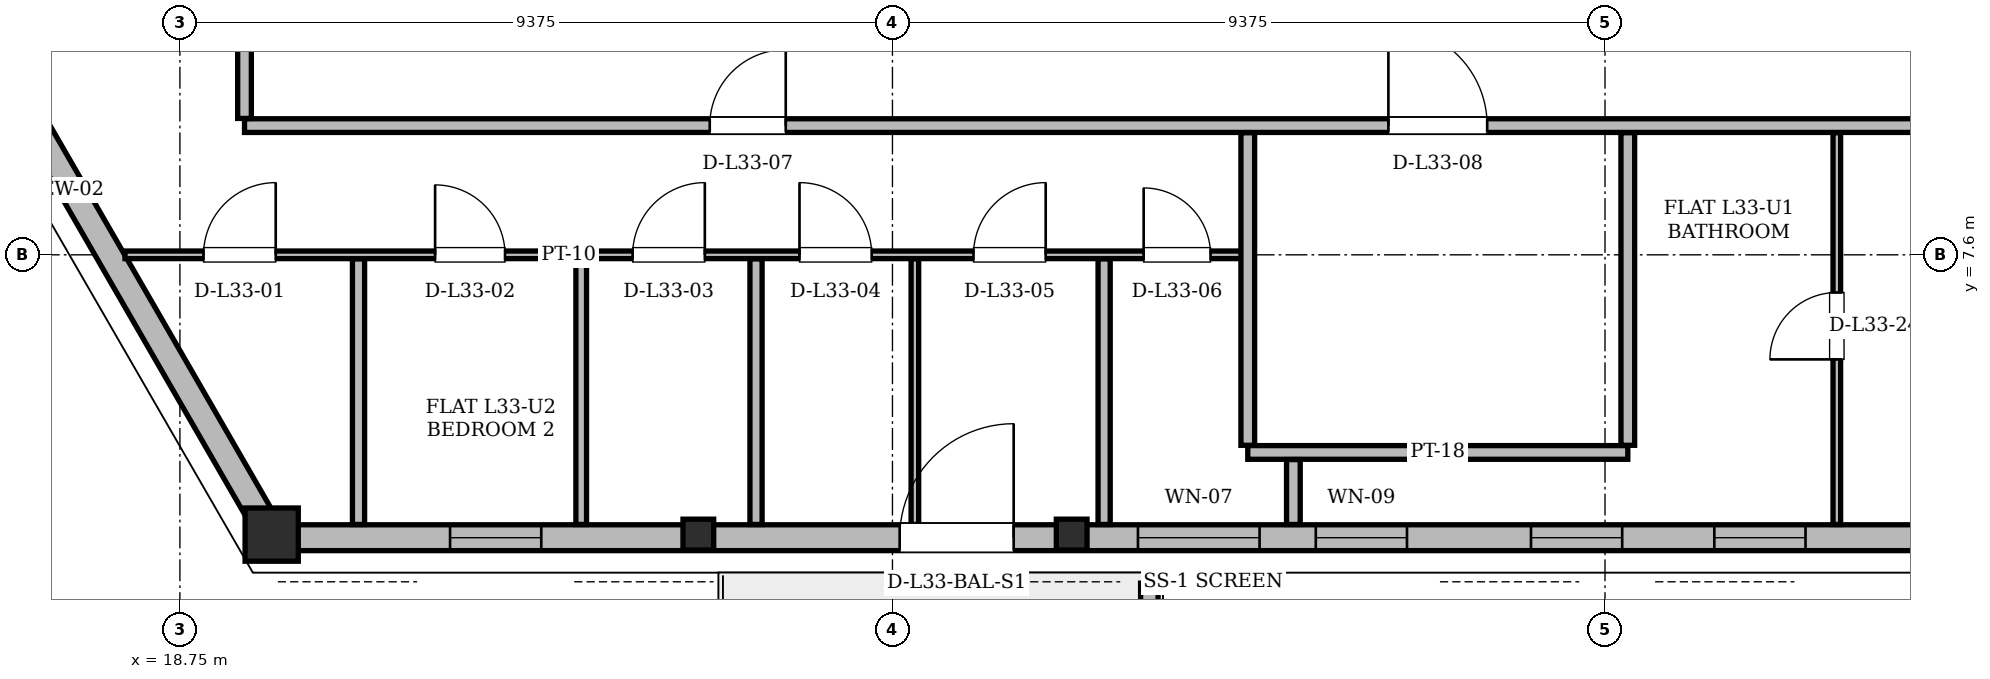
"""IFC4 building model, lengths in metres.
Left out: names, types, materials, properties, quantities, classifications, styles, units other than length and angle.
Written with IfcOpenShell. Run it as: python <this file> out.ifc"""

import sys

from ifc_helpers import new_model, si_unit, direction, frame, frame_2d, origin, origin_2d, place, context, subcontext, project, spatial, polyline, rectangle, hollow_rectangle, i_section, outline, extrude, element, fill, save


model = new_model("IFC4")
c1 = context("Model", 3, precision=1e-05, world=origin(), true_north=direction((0.0, 1.0)))
c2 = subcontext(c1, "Body", "Model", "MODEL_VIEW")
j1 = project(units=[si_unit("LENGTHUNIT", "METRE"), si_unit("PLANEANGLEUNIT", "RADIAN")], contexts=[c1])
p1 = place(None, origin())
s1 = spatial("IfcSite", under=j1, at=p1, CompositionType="ELEMENT")
p2 = place(p1, origin())
s2 = spatial("IfcBuilding", under=s1, at=p2, CompositionType="ELEMENT")
p3 = place(p2, frame((0.0, 0.0, 126.6)))
s3 = spatial("IfcBuildingStorey", under=s2, at=p3, CompositionType="ELEMENT", Elevation=126.6)
p4 = place(p3, frame((19.976, 3.878, 0.004), z_axis=(-0.010126722632, 0.022700170195, 0.999691028149), x_axis=(-0.913246900768, -0.40740655154, 0.0)))
e1 = element("IfcColumn", 1, at=p4, inside=s3, PredefinedType="COLUMN", context=c2, shape_type="SweptSolid", body=[
    extrude(hollow_rectangle(XDim=0.7, YDim=0.7, WallThickness=0.055, at=origin_2d()), origin(), (0.0, 0.0, 1.0), 3.592),
])
for number, where, z_axis, x_axis in (
    (2, (25.583, 3.878, 0.004), (-0.007, 0.023, 1.0), (-0.957, -0.289, 0.0)),
    (3, (30.49, 3.878, 0.004), (-0.004, 0.023, 1.0), (-0.984, -0.177, 0.0)),
):
    element("IfcColumn", number, at=place(p3, frame(where, z_axis=z_axis, x_axis=x_axis)), inside=s3, PredefinedType="COLUMN", context=c2, shape_type="SweptSolid", body=[
        extrude(i_section(OverallWidth=0.404, OverallDepth=0.406, WebThickness=0.027, FlangeThickness=0.044, at=origin_2d()), origin(), (0.0, 0.0, 1.0), 3.592),
    ])
p5 = place(p3, frame((14.689, 13.034, 0.0), z_axis=(0.0, 0.0, 1.0), x_axis=(0.500003640647, -0.866023301845, 0.0)))
e4 = element("IfcWall", 4, at=p5, inside=s3, PredefinedType="SOLIDWALL", context=c2, shape_type="SweptSolid", body=[
    extrude(rectangle(XDim=10.572, YDim=0.34, at=frame_2d((5.286, 0.0))), origin(), (0.0, 0.0, 1.0), 2.578),
])
p6 = place(p3, frame((19.976, 3.878, 0.0), z_axis=(0.0, 0.0, 1.0), x_axis=(1.0, 0.0, 0.0)))
e5 = element("IfcWall", 5, at=p6, inside=s3, PredefinedType="SOLIDWALL", context=c2, shape_type="SweptSolid", body=[
    extrude(rectangle(XDim=35.049, YDim=0.34, at=frame_2d((17.524, 0.0))), origin(), (0.0, 0.0, 1.0), 2.578),
])
p7 = place(p6, frame((8.244, 0.0, 0.0)))
e6 = element("IfcOpeningElement", 6, at=p7, cuts=e5, PredefinedType="OPENING", context=c2, shape_type="SweptSolid", body=[
    extrude(rectangle(XDim=1.5, YDim=2.2, at=frame_2d((0.75, 1.1))), frame((0.0, 0.17, 0.0), z_axis=(0.0, -1.0, 0.0), x_axis=(1.0, 0.0, 0.0)), (0.0, 0.0, 1.0), 0.34),
])
p8 = place(p6, frame((27.18, 0.0, 0.0)))
e7 = element("IfcOpeningElement", 7, at=p8, cuts=e5, PredefinedType="OPENING", context=c2, shape_type="SweptSolid", body=[
    extrude(rectangle(XDim=1.5, YDim=2.2, at=frame_2d((0.75, 1.1))), frame((0.0, 0.17, 0.0), z_axis=(0.0, -1.0, 0.0), x_axis=(1.0, 0.0, 0.0)), (0.0, 0.0, 1.0), 0.34),
])
p9 = place(p6, frame((13.719, 0.0, 0.85)))
e8 = element("IfcOpeningElement", 8, at=p9, cuts=e5, PredefinedType="OPENING", context=c2, shape_type="SweptSolid", body=[
    extrude(rectangle(XDim=1.2, YDim=1.48, at=frame_2d((0.6, 0.74))), frame((0.0, 0.17, 0.0), z_axis=(0.0, -1.0, 0.0), x_axis=(1.0, 0.0, 0.0)), (0.0, 0.0, 1.0), 0.34),
])
p10 = place(p6, frame((16.551, 0.0, 0.85)))
e9 = element("IfcOpeningElement", 9, at=p10, cuts=e5, PredefinedType="OPENING", context=c2, shape_type="SweptSolid", body=[
    extrude(rectangle(XDim=1.2, YDim=1.48, at=frame_2d((0.6, 0.74))), frame((0.0, 0.17, 0.0), z_axis=(0.0, -1.0, 0.0), x_axis=(1.0, 0.0, 0.0)), (0.0, 0.0, 1.0), 0.34),
])
p11 = place(p6, frame((22.366, 0.0, 0.85)))
e10 = element("IfcOpeningElement", 10, at=p11, cuts=e5, PredefinedType="OPENING", context=c2, shape_type="SweptSolid", body=[
    extrude(rectangle(XDim=1.2, YDim=1.48, at=frame_2d((0.6, 0.74))), frame((0.0, 0.17, 0.0), z_axis=(0.0, -1.0, 0.0), x_axis=(1.0, 0.0, 0.0)), (0.0, 0.0, 1.0), 0.34),
])
p12 = place(p6, frame((30.777, 0.0, 0.85)))
e11 = element("IfcOpeningElement", 11, at=p12, cuts=e5, PredefinedType="OPENING", context=c2, shape_type="SweptSolid", body=[
    extrude(rectangle(XDim=2.6, YDim=1.618, at=frame_2d((1.3, 0.809))), frame((0.0, 0.17, 0.0), z_axis=(0.0, -1.0, 0.0), x_axis=(1.0, 0.0, 0.0)), (0.0, 0.0, 1.0), 0.34),
])
p13 = place(p6, frame((18.963, 0.0, 0.85)))
e12 = element("IfcOpeningElement", 12, at=p13, cuts=e5, PredefinedType="OPENING", context=c2, shape_type="SweptSolid", body=[
    extrude(rectangle(XDim=1.2, YDim=1.48, at=frame_2d((0.6, 0.74))), frame((0.0, 0.17, 0.0), z_axis=(0.0, -1.0, 0.0), x_axis=(1.0, 0.0, 0.0)), (0.0, 0.0, 1.0), 0.34),
])
p14 = place(p6, frame((2.329, 0.0, 0.85)))
e13 = element("IfcOpeningElement", 13, at=p14, cuts=e5, PredefinedType="OPENING", context=c2, shape_type="SweptSolid", body=[
    extrude(rectangle(XDim=1.2, YDim=1.48, at=frame_2d((0.6, 0.74))), frame((0.0, 0.17, 0.0), z_axis=(0.0, -1.0, 0.0), x_axis=(1.0, 0.0, 0.0)), (0.0, 0.0, 1.0), 0.34),
])
p15 = place(p6, frame((11.38, 0.0, 0.85)))
e14 = element("IfcOpeningElement", 14, at=p15, cuts=e5, PredefinedType="OPENING", context=c2, shape_type="SweptSolid", body=[
    extrude(rectangle(XDim=1.6, YDim=1.618, at=frame_2d((0.8, 0.809))), frame((0.0, 0.17, 0.0), z_axis=(0.0, -1.0, 0.0), x_axis=(1.0, 0.0, 0.0)), (0.0, 0.0, 1.0), 0.34),
])
p16 = place(p3, frame((31.505, 3.28, 0.0), z_axis=(0.0, 0.0, 1.0), x_axis=(0.0, -1.0, 0.0)))
e15 = element("IfcWall", 15, at=p16, inside=s3, PredefinedType="PARAPET", context=c2, shape_type="SweptSolid", body=[
    extrude(outline(polyline([(0.0, 0.0), (2.042, 0.0), (2.042, 1.1), (0.0, 1.32), (0.0, 0.0)])), frame((0.0, 0.115, 0.0), z_axis=(0.0, -1.0, 0.0), x_axis=(1.0, 0.0, 0.0)), (0.0, 0.0, 1.0), 0.23),
])
p17 = place(p3, frame((32.8, 5.0, 0.0), z_axis=(0.0, 0.0, 1.0), x_axis=(1.0, 0.0, 0.0)))
e16 = element("IfcWall", 16, at=p17, inside=s3, PredefinedType="PARTITIONING", context=c2, shape_type="SweptSolid", body=[
    extrude(rectangle(XDim=5.0, YDim=0.18, at=frame_2d((2.5, 0.0))), origin(), (0.0, 0.0, 1.0), 3.36),
])
p18 = place(p3, frame((18.028, 7.6, 0.0), z_axis=(0.0, 0.0, 1.0), x_axis=(1.0, 0.0, 0.0)))
e17 = element("IfcWall", 17, at=p18, inside=s3, PredefinedType="PARTITIONING", context=c2, shape_type="SweptSolid", body=[
    extrude(rectangle(XDim=14.823, YDim=0.1, at=frame_2d((7.411, 0.0))), origin(), (0.0, 0.0, 1.0), 2.814),
])
p19 = place(p18, frame((1.033, 0.0, 0.0)))
e18 = element("IfcOpeningElement", 18, at=p19, cuts=e17, PredefinedType="OPENING", context=c2, shape_type="SweptSolid", body=[
    extrude(rectangle(XDim=0.95, YDim=2.1, at=frame_2d((0.475, 1.05))), frame((0.0, 0.05, 0.0), z_axis=(0.0, -1.0, 0.0), x_axis=(1.0, 0.0, 0.0)), (0.0, 0.0, 1.0), 0.1),
])
p20 = place(p18, frame((4.08, 0.0, 0.0)))
e19 = element("IfcOpeningElement", 19, at=p20, cuts=e17, PredefinedType="OPENING", context=c2, shape_type="SweptSolid", body=[
    extrude(rectangle(XDim=0.92, YDim=2.12, at=frame_2d((0.46, 1.06))), frame((0.0, 0.05, 0.0), z_axis=(0.0, -1.0, 0.0), x_axis=(1.0, 0.0, 0.0)), (0.0, 0.0, 1.0), 0.1),
])
p21 = place(p18, frame((6.679, 0.0, 0.0)))
e20 = element("IfcOpeningElement", 20, at=p21, cuts=e17, PredefinedType="OPENING", context=c2, shape_type="SweptSolid", body=[
    extrude(rectangle(XDim=0.95, YDim=2.1, at=frame_2d((0.475, 1.05))), frame((0.0, 0.05, 0.0), z_axis=(0.0, -1.0, 0.0), x_axis=(1.0, 0.0, 0.0)), (0.0, 0.0, 1.0), 0.1),
])
p22 = place(p18, frame((8.874, 0.0, 0.0)))
e21 = element("IfcOpeningElement", 21, at=p22, cuts=e17, PredefinedType="OPENING", context=c2, shape_type="SweptSolid", body=[
    extrude(rectangle(XDim=0.95, YDim=2.1, at=frame_2d((0.475, 1.05))), frame((0.0, 0.05, 0.0), z_axis=(0.0, -1.0, 0.0), x_axis=(1.0, 0.0, 0.0)), (0.0, 0.0, 1.0), 0.1),
])
p23 = place(p18, frame((11.164, 0.0, 0.0)))
e22 = element("IfcOpeningElement", 22, at=p23, cuts=e17, PredefinedType="OPENING", context=c2, shape_type="SweptSolid", body=[
    extrude(rectangle(XDim=0.95, YDim=2.1, at=frame_2d((0.475, 1.05))), frame((0.0, 0.05, 0.0), z_axis=(0.0, -1.0, 0.0), x_axis=(1.0, 0.0, 0.0)), (0.0, 0.0, 1.0), 0.1),
])
p24 = place(p18, frame((13.402, 0.0, 0.0)))
e23 = element("IfcOpeningElement", 23, at=p24, cuts=e17, PredefinedType="OPENING", context=c2, shape_type="SweptSolid", body=[
    extrude(rectangle(XDim=0.88, YDim=2.08, at=frame_2d((0.44, 1.04))), frame((0.0, 0.05, 0.0), z_axis=(0.0, -1.0, 0.0), x_axis=(1.0, 0.0, 0.0)), (0.0, 0.0, 1.0), 0.1),
])
p25 = place(p3, frame((19.6, 9.3, 0.0), z_axis=(0.0, 0.0, 1.0), x_axis=(1.0, 0.0, 0.0)))
e24 = element("IfcWall", 24, at=p25, inside=s3, PredefinedType="PARTITIONING", context=c2, shape_type="SweptSolid", body=[
    extrude(rectangle(XDim=30.4, YDim=0.18, at=frame_2d((15.2, 0.0))), origin(), (0.0, 0.0, 1.0), 2.814),
])
p26 = place(p25, frame((6.121, 0.0, 0.0)))
e25 = element("IfcOpeningElement", 25, at=p26, cuts=e24, PredefinedType="OPENING", context=c2, shape_type="SweptSolid", body=[
    extrude(rectangle(XDim=1.0, YDim=2.18, at=frame_2d((0.5, 1.09))), frame((0.0, 0.09, 0.0), z_axis=(0.0, -1.0, 0.0), x_axis=(1.0, 0.0, 0.0)), (0.0, 0.0, 1.0), 0.18),
])
p27 = place(p25, frame((15.05, 0.0, 0.0)))
e26 = element("IfcOpeningElement", 26, at=p27, cuts=e24, PredefinedType="OPENING", context=c2, shape_type="SweptSolid", body=[
    extrude(rectangle(XDim=1.3, YDim=2.2, at=frame_2d((0.65, 1.1))), frame((0.0, 0.09, 0.0), z_axis=(0.0, -1.0, 0.0), x_axis=(1.0, 0.0, 0.0)), (0.0, 0.0, 1.0), 0.18),
])
p28 = place(p25, frame((24.631, 0.0, 0.0)))
e27 = element("IfcOpeningElement", 27, at=p28, cuts=e24, PredefinedType="OPENING", context=c2, shape_type="SweptSolid", body=[
    extrude(rectangle(XDim=1.0, YDim=2.18, at=frame_2d((0.5, 1.09))), frame((0.0, 0.09, 0.0), z_axis=(0.0, -1.0, 0.0), x_axis=(1.0, 0.0, 0.0)), (0.0, 0.0, 1.0), 0.18),
])
p29 = place(p3, frame((19.6, 9.394, 0.0), z_axis=(0.0, 0.0, 1.0), x_axis=(0.0, 1.0, 0.0)))
e28 = element("IfcWall", 28, at=p29, inside=s3, PredefinedType="PARTITIONING", context=c2, shape_type="SweptSolid", body=[
    extrude(rectangle(XDim=1.462, YDim=0.18, at=frame_2d((0.731, 0.0))), origin(), (0.0, 0.0, 1.0), 3.36),
])
p30 = place(p3, frame((21.1, 4.052, 0.0), z_axis=(0.0, 0.0, 1.0), x_axis=(0.0, 1.0, 0.0)))
e29 = element("IfcWall", 29, at=p30, inside=s3, PredefinedType="PARTITIONING", context=c2, shape_type="SweptSolid", body=[
    extrude(rectangle(XDim=3.494, YDim=0.16, at=frame_2d((1.747, 0.0))), origin(), (0.0, 0.0, 1.0), 2.814),
])
p31 = place(p3, frame((24.03, 4.052, 0.0), z_axis=(0.0, 0.0, 1.0), x_axis=(0.0, 1.0, 0.0)))
e30 = element("IfcWall", 30, at=p31, inside=s3, PredefinedType="PARTITIONING", context=c2, shape_type="SweptSolid", body=[
    extrude(rectangle(XDim=3.494, YDim=0.14, at=frame_2d((1.747, 0.0))), origin(), (0.0, 0.0, 1.0), 2.814),
])
p32 = place(p3, frame((26.33, 4.052, 0.0), z_axis=(0.0, 0.0, 1.0), x_axis=(0.0, 1.0, 0.0)))
e31 = element("IfcWall", 31, at=p32, inside=s3, PredefinedType="PARTITIONING", context=c2, shape_type="SweptSolid", body=[
    extrude(rectangle(XDim=3.494, YDim=0.16, at=frame_2d((1.747, 0.0))), origin(), (0.0, 0.0, 1.0), 2.946),
])
p33 = place(p3, frame((28.42, 4.052, 0.0), z_axis=(0.0, 0.0, 1.0), x_axis=(0.0, 1.0, 0.0)))
e32 = element("IfcWall", 32, at=p33, inside=s3, PredefinedType="PARTITIONING", context=c2, shape_type="SweptSolid", body=[
    extrude(rectangle(XDim=3.494, YDim=0.1, at=frame_2d((1.747, 0.0))), origin(), (0.0, 0.0, 1.0), 3.36),
])
p34 = place(p3, frame((30.91, 4.052, 0.0), z_axis=(0.0, 0.0, 1.0), x_axis=(0.0, 1.0, 0.0)))
e33 = element("IfcWall", 33, at=p34, inside=s3, PredefinedType="PARTITIONING", context=c2, shape_type="SweptSolid", body=[
    extrude(rectangle(XDim=3.494, YDim=0.16, at=frame_2d((1.747, 0.0))), origin(), (0.0, 0.0, 1.0), 2.946),
])
p35 = place(p3, frame((32.8, 5.094, 0.0), z_axis=(0.0, 0.0, 1.0), x_axis=(0.0, 1.0, 0.0)))
e34 = element("IfcWall", 34, at=p35, inside=s3, PredefinedType="PARTITIONING", context=c2, shape_type="SweptSolid", body=[
    extrude(rectangle(XDim=4.112, YDim=0.18, at=frame_2d((2.056, 0.0))), origin(), (0.0, 0.0, 1.0), 2.946),
])
p36 = place(p3, frame((33.4, 4.052, 0.0), z_axis=(0.0, 0.0, 1.0), x_axis=(0.0, 1.0, 0.0)))
e35 = element("IfcWall", 35, at=p36, inside=s3, PredefinedType="PARTITIONING", context=c2, shape_type="SweptSolid", body=[
    extrude(rectangle(XDim=0.854, YDim=0.18, at=frame_2d((0.427, 0.0))), origin(), (0.0, 0.0, 1.0), 3.36),
])
p37 = place(p3, frame((37.8, 5.094, 0.0), z_axis=(0.0, 0.0, 1.0), x_axis=(0.0, 1.0, 0.0)))
e36 = element("IfcWall", 36, at=p37, inside=s3, PredefinedType="PARTITIONING", context=c2, shape_type="SweptSolid", body=[
    extrude(rectangle(XDim=4.112, YDim=0.18, at=frame_2d((2.056, 0.0))), origin(), (0.0, 0.0, 1.0), 3.36),
])
p38 = place(p3, frame((40.55, 4.052, 0.0), z_axis=(0.0, 0.0, 1.0), x_axis=(0.0, 1.0, 0.0)))
e37 = element("IfcWall", 37, at=p38, inside=s3, PredefinedType="PARTITIONING", context=c2, shape_type="SweptSolid", body=[
    extrude(rectangle(XDim=5.154, YDim=0.1, at=frame_2d((2.577, 0.0))), origin(), (0.0, 0.0, 1.0), 3.36),
])
p39 = place(p38, frame((2.172, 0.0, 0.0)))
e38 = element("IfcOpeningElement", 38, at=p39, cuts=e37, PredefinedType="OPENING", context=c2, shape_type="SweptSolid", body=[
    extrude(rectangle(XDim=0.88, YDim=2.08, at=frame_2d((0.44, 1.04))), frame((0.0, 0.05, 0.0), z_axis=(0.0, -1.0, 0.0), x_axis=(1.0, 0.0, 0.0)), (0.0, 0.0, 1.0), 0.1),
])
p40 = place(p7, origin())
e39 = element("IfcDoor", 39, at=p40, inside=s3, OperationType="SINGLE_SWING_RIGHT", PredefinedType="DOOR", context=c2, shape_type="SweptSolid", body=[
    extrude(rectangle(XDim=1.5, YDim=2.2, at=frame_2d((0.75, 1.1))), frame((0.0, 0.025, 0.0), z_axis=(0.0, -1.0, 0.0), x_axis=(1.0, 0.0, 0.0)), (0.0, 0.0, 1.0), 0.05),
])
fill(e6, e39)
p41 = place(p9, origin())
e40 = element("IfcWindow", 40, at=p41, inside=s3, PartitioningType="SINGLE_PANEL", PredefinedType="WINDOW", context=c2, shape_type="SweptSolid", body=[
    extrude(rectangle(XDim=1.2, YDim=1.48, at=frame_2d((0.6, 0.74))), frame((0.0, 0.03, 0.0), z_axis=(0.0, -1.0, 0.0), x_axis=(1.0, 0.0, 0.0)), (0.0, 0.0, 1.0), 0.06),
])
fill(e8, e40)
p42 = place(p10, origin())
e41 = element("IfcWindow", 41, at=p42, inside=s3, PartitioningType="SINGLE_PANEL", PredefinedType="WINDOW", context=c2, shape_type="SweptSolid", body=[
    extrude(rectangle(XDim=1.2, YDim=1.48, at=frame_2d((0.6, 0.74))), frame((0.0, 0.03, 0.0), z_axis=(0.0, -1.0, 0.0), x_axis=(1.0, 0.0, 0.0)), (0.0, 0.0, 1.0), 0.06),
])
fill(e9, e41)
p43 = place(p13, origin())
e42 = element("IfcWindow", 42, at=p43, inside=s3, PartitioningType="SINGLE_PANEL", PredefinedType="WINDOW", context=c2, shape_type="SweptSolid", body=[
    extrude(rectangle(XDim=1.2, YDim=1.48, at=frame_2d((0.6, 0.74))), frame((0.0, 0.03, 0.0), z_axis=(0.0, -1.0, 0.0), x_axis=(1.0, 0.0, 0.0)), (0.0, 0.0, 1.0), 0.06),
])
fill(e12, e42)
p44 = place(p14, origin())
e43 = element("IfcWindow", 43, at=p44, inside=s3, PartitioningType="SINGLE_PANEL", PredefinedType="WINDOW", context=c2, shape_type="SweptSolid", body=[
    extrude(rectangle(XDim=1.2, YDim=1.48, at=frame_2d((0.6, 0.74))), frame((0.0, 0.03, 0.0), z_axis=(0.0, -1.0, 0.0), x_axis=(1.0, 0.0, 0.0)), (0.0, 0.0, 1.0), 0.06),
])
fill(e13, e43)
p45 = place(p15, origin())
e44 = element("IfcWindow", 44, at=p45, inside=s3, PartitioningType="SINGLE_PANEL", PredefinedType="WINDOW", context=c2, shape_type="SweptSolid", body=[
    extrude(rectangle(XDim=1.6, YDim=1.618, at=frame_2d((0.8, 0.809))), frame((0.0, 0.03, 0.0), z_axis=(0.0, -1.0, 0.0), x_axis=(1.0, 0.0, 0.0)), (0.0, 0.0, 1.0), 0.06),
])
fill(e14, e44)
p46 = place(p19, origin())
e45 = element("IfcDoor", 45, at=p46, inside=s3, OperationType="SINGLE_SWING_RIGHT", PredefinedType="DOOR", context=c2, shape_type="SweptSolid", body=[
    extrude(rectangle(XDim=0.95, YDim=2.1, at=frame_2d((0.475, 1.05))), frame((0.0, 0.025, 0.0), z_axis=(0.0, -1.0, 0.0), x_axis=(1.0, 0.0, 0.0)), (0.0, 0.0, 1.0), 0.05),
])
fill(e18, e45)
p47 = place(p20, origin())
e46 = element("IfcDoor", 46, at=p47, inside=s3, OperationType="SINGLE_SWING_LEFT", PredefinedType="DOOR", context=c2, shape_type="SweptSolid", body=[
    extrude(rectangle(XDim=0.92, YDim=2.12, at=frame_2d((0.46, 1.06))), frame((0.0, 0.025, 0.0), z_axis=(0.0, -1.0, 0.0), x_axis=(1.0, 0.0, 0.0)), (0.0, 0.0, 1.0), 0.05),
])
fill(e19, e46)
p48 = place(p21, origin())
e47 = element("IfcDoor", 47, at=p48, inside=s3, OperationType="SINGLE_SWING_RIGHT", PredefinedType="DOOR", context=c2, shape_type="SweptSolid", body=[
    extrude(rectangle(XDim=0.95, YDim=2.1, at=frame_2d((0.475, 1.05))), frame((0.0, 0.025, 0.0), z_axis=(0.0, -1.0, 0.0), x_axis=(1.0, 0.0, 0.0)), (0.0, 0.0, 1.0), 0.05),
])
fill(e20, e47)
p49 = place(p22, origin())
e48 = element("IfcDoor", 48, at=p49, inside=s3, OperationType="SINGLE_SWING_LEFT", PredefinedType="DOOR", context=c2, shape_type="SweptSolid", body=[
    extrude(rectangle(XDim=0.95, YDim=2.1, at=frame_2d((0.475, 1.05))), frame((0.0, 0.025, 0.0), z_axis=(0.0, -1.0, 0.0), x_axis=(1.0, 0.0, 0.0)), (0.0, 0.0, 1.0), 0.05),
])
fill(e21, e48)
p50 = place(p23, origin())
e49 = element("IfcDoor", 49, at=p50, inside=s3, OperationType="SINGLE_SWING_RIGHT", PredefinedType="DOOR", context=c2, shape_type="SweptSolid", body=[
    extrude(rectangle(XDim=0.95, YDim=2.1, at=frame_2d((0.475, 1.05))), frame((0.0, 0.025, 0.0), z_axis=(0.0, -1.0, 0.0), x_axis=(1.0, 0.0, 0.0)), (0.0, 0.0, 1.0), 0.05),
])
fill(e22, e49)
p51 = place(p24, origin())
e50 = element("IfcDoor", 50, at=p51, inside=s3, OperationType="SINGLE_SWING_LEFT", PredefinedType="DOOR", context=c2, shape_type="SweptSolid", body=[
    extrude(rectangle(XDim=0.88, YDim=2.08, at=frame_2d((0.44, 1.04))), frame((0.0, 0.025, 0.0), z_axis=(0.0, -1.0, 0.0), x_axis=(1.0, 0.0, 0.0)), (0.0, 0.0, 1.0), 0.05),
])
fill(e23, e50)
p52 = place(p26, origin())
e51 = element("IfcDoor", 51, at=p52, inside=s3, OperationType="SINGLE_SWING_RIGHT", PredefinedType="DOOR", context=c2, shape_type="SweptSolid", body=[
    extrude(rectangle(XDim=1.0, YDim=2.18, at=frame_2d((0.5, 1.09))), frame((0.0, 0.025, 0.0), z_axis=(0.0, -1.0, 0.0), x_axis=(1.0, 0.0, 0.0)), (0.0, 0.0, 1.0), 0.05),
])
fill(e25, e51)
p53 = place(p27, origin())
e52 = element("IfcDoor", 52, at=p53, inside=s3, OperationType="SINGLE_SWING_LEFT", PredefinedType="DOOR", context=c2, shape_type="SweptSolid", body=[
    extrude(rectangle(XDim=1.3, YDim=2.2, at=frame_2d((0.65, 1.1))), frame((0.0, 0.025, 0.0), z_axis=(0.0, -1.0, 0.0), x_axis=(1.0, 0.0, 0.0)), (0.0, 0.0, 1.0), 0.05),
])
fill(e26, e52)
p54 = place(p39, origin())
e53 = element("IfcDoor", 53, at=p54, inside=s3, OperationType="SINGLE_SWING_LEFT", PredefinedType="DOOR", context=c2, shape_type="SweptSolid", body=[
    extrude(rectangle(XDim=0.88, YDim=2.08, at=frame_2d((0.44, 1.04))), frame((0.0, 0.025, 0.0), z_axis=(0.0, -1.0, 0.0), x_axis=(1.0, 0.0, 0.0)), (0.0, 0.0, 1.0), 0.05),
])
fill(e38, e53)
save(model, sys.argv[1])
